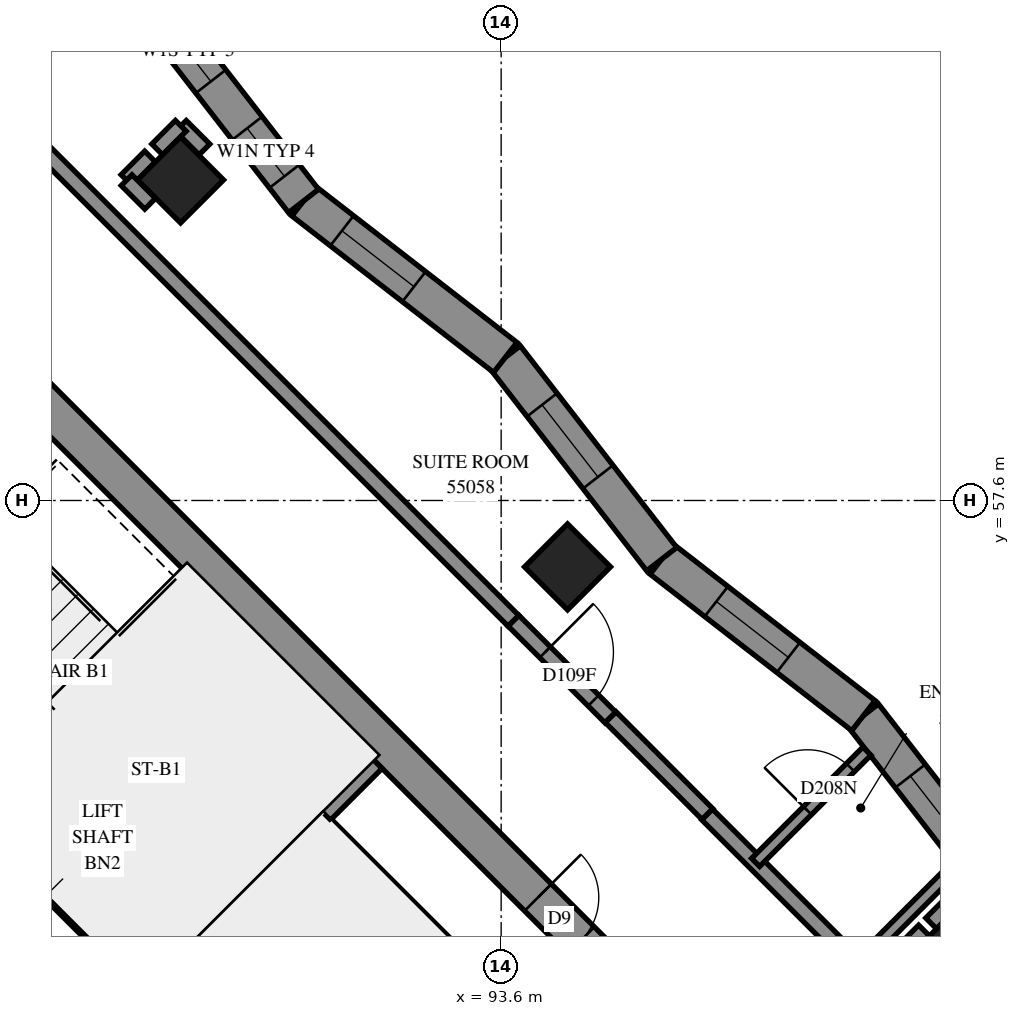
"""IFC4 building model, lengths in metres.
Left out: names, types, materials, properties, quantities, classifications, styles, units other than length and angle.
Written with IfcOpenShell. Run it as: python <this file> out.ifc"""

import sys

from ifc_helpers import new_model, si_unit, direction, frame, frame_2d, origin, origin_2d, place, context, subcontext, project, spatial, polyline, rectangle, outline, extrude, element, fill, save


model = new_model("IFC4")
c1 = context("Model", 3, precision=1e-05, world=origin(), true_north=direction((0.0, 1.0)))
c2 = subcontext(c1, "Body", "Model", "MODEL_VIEW")
j1 = project(units=[si_unit("LENGTHUNIT", "METRE"), si_unit("PLANEANGLEUNIT", "RADIAN")], contexts=[c1])
p1 = place(None, origin())
s1 = spatial("IfcSite", under=j1, at=p1, CompositionType="ELEMENT")
p2 = place(p1, origin())
s2 = spatial("IfcBuilding", under=s1, at=p2, CompositionType="ELEMENT")
p3 = place(p2, frame((0.0, 0.0, 203.2)))
s3 = spatial("IfcBuildingStorey", under=s2, at=p3, CompositionType="ELEMENT", Elevation=203.2)
for number, where, z_axis, x_axis in (
    (1, (89.382, 61.818, 0.0), (0.0, 0.0, 1.0), (0.707, -0.707, 0.0)),
    (2, (94.474, 56.727, 0.0), (0.0, 0.0, 1.0), (0.707, -0.707, 0.0)),
    (3, (99.565, 51.635, 0.0), (0.0, 0.0, 1.0), (0.707, -0.707, 0.0)),
):
    element("IfcColumn", number, at=place(p3, frame(where, z_axis=z_axis, x_axis=x_axis)), inside=s3, PredefinedType="COLUMN", context=c2, shape_type="SweptSolid", body=[
        extrude(rectangle(XDim=0.8, YDim=0.8, at=origin_2d()), origin(), (0.0, 0.0, 1.0), 3.1),
    ])
p4 = place(p3, frame((86.66, 59.802, -0.3), z_axis=(0.0, 0.0, 1.0), x_axis=(0.7071067812, -0.7071067812, 0.0)))
e4 = element("IfcWall", 4, at=p4, inside=s3, PredefinedType="SHEAR", context=c2, shape_type="SweptSolid", body=[
    extrude(rectangle(XDim=15.4, YDim=0.5, at=frame_2d((7.7, 0.0))), origin(), (0.0, 0.0, 1.0), 2.7),
])
p5 = place(p4, frame((10.5, 0.0, 0.3)))
e5 = element("IfcOpeningElement", 5, at=p5, cuts=e4, PredefinedType="OPENING", context=c2, shape_type="SweptSolid", body=[
    extrude(rectangle(XDim=0.8, YDim=2.1, at=frame_2d((0.4, 1.05))), frame((0.0, 0.26, 0.0), z_axis=(0.0, -1.0, 0.0), x_axis=(1.0, 0.0, 0.0)), (0.0, 0.0, 1.0), 0.52),
])
p6 = place(p3, frame((81.534, 53.969, 0.0), z_axis=(0.0, 0.0, 1.0), x_axis=(0.707103309, -0.7071102534, 0.0)))
e6 = element("IfcWall", 6, at=p6, inside=s3, PredefinedType="SOLIDWALL", context=c2, shape_type="SweptSolid", body=[
    extrude(rectangle(XDim=14.4, YDim=0.3, at=frame_2d((7.2, 0.0))), origin(), (0.0, 0.0, 1.0), 3.1),
])
p7 = place(p6, frame((1.25, 0.0, 0.0)))
e7 = element("IfcOpeningElement", 7, at=p7, cuts=e6, PredefinedType="OPENING", context=c2, shape_type="SweptSolid", body=[
    extrude(rectangle(XDim=1.1, YDim=2.1, at=frame_2d((0.55, 1.05))), frame((0.0, 0.16, 0.0), z_axis=(0.0, -1.0, 0.0), x_axis=(1.0, 0.0, 0.0)), (0.0, 0.0, 1.0), 0.32),
])
p8 = place(p6, frame((4.85, 0.0, 0.0)))
e8 = element("IfcOpeningElement", 8, at=p8, cuts=e6, PredefinedType="OPENING", context=c2, shape_type="SweptSolid", body=[
    extrude(rectangle(XDim=1.1, YDim=2.1, at=frame_2d((0.55, 1.05))), frame((0.0, 0.16, 0.0), z_axis=(0.0, -1.0, 0.0), x_axis=(1.0, 0.0, 0.0)), (0.0, 0.0, 1.0), 0.32),
])
p9 = place(p6, frame((8.45, 0.0, 0.0)))
e9 = element("IfcOpeningElement", 9, at=p9, cuts=e6, PredefinedType="OPENING", context=c2, shape_type="SweptSolid", body=[
    extrude(rectangle(XDim=1.1, YDim=2.1, at=frame_2d((0.55, 1.05))), frame((0.0, 0.16, 0.0), z_axis=(0.0, -1.0, 0.0), x_axis=(1.0, 0.0, 0.0)), (0.0, 0.0, 1.0), 0.32),
])
p10 = place(p6, frame((12.05, 0.0, 0.0)))
e10 = element("IfcOpeningElement", 10, at=p10, cuts=e6, PredefinedType="OPENING", context=c2, shape_type="SweptSolid", body=[
    extrude(rectangle(XDim=1.1, YDim=2.1, at=frame_2d((0.55, 1.05))), frame((0.0, 0.16, 0.0), z_axis=(0.0, -1.0, 0.0), x_axis=(1.0, 0.0, 0.0)), (0.0, 0.0, 1.0), 0.32),
])
p11 = place(p3, frame((83.867, 56.302, 0.0), z_axis=(0.0, 0.0, 1.0), x_axis=(0.7071137256, -0.7070998367, 0.0)))
e11 = element("IfcWall", 11, at=p11, inside=s3, PredefinedType="SOLIDWALL", context=c2, shape_type="SweptSolid", body=[
    extrude(rectangle(XDim=7.2, YDim=0.3, at=frame_2d((3.6, 0.0))), origin(), (0.0, 0.0, 1.0), 3.1),
])
p12 = place(p3, frame((88.958, 51.211, 0.0), z_axis=(0.0, 0.0, 1.0), x_axis=(0.7071067812, 0.7071067812, 0.0)))
e12 = element("IfcWall", 12, at=p12, inside=s3, PredefinedType="SOLIDWALL", context=c2, shape_type="SweptSolid", body=[
    extrude(rectangle(XDim=4.2, YDim=0.3, at=frame_2d((2.1, 0.0))), origin(), (0.0, 0.0, 1.0), 3.1),
])
p13 = place(p3, frame((100.438, 52.099, 0.0), z_axis=(0.0, 0.0, 1.0), x_axis=(-0.6128751624, 0.7901797487, 0.0)))
e13 = element("IfcWall", 13, at=p13, inside=s3, PredefinedType="SOLIDWALL", context=c2, shape_type="SweptSolid", body=[
    extrude(outline(polyline([(0.054, -0.25), (3.412, -0.25), (3.349, 0.25), (-0.054, 0.25), (0.054, -0.25)])), origin(), (0.0, 0.0, 1.0), 3.1),
])
p14 = place(p13, frame((1.175, 0.0, 0.45)))
e14 = element("IfcOpeningElement", 14, at=p14, cuts=e13, PredefinedType="OPENING", context=c2, shape_type="SweptSolid", body=[
    extrude(rectangle(XDim=1.2, YDim=2.5, at=frame_2d((0.6, 1.25))), frame((0.0, 0.26, 0.0), z_axis=(0.0, -1.0, 0.0), x_axis=(1.0, 0.0, 0.0)), (0.0, 0.0, 1.0), 0.52),
])
p15 = place(p3, frame((98.366, 54.77, 0.0), z_axis=(0.0, 0.0, 1.0), x_axis=(-0.7901836045, 0.6128701911, 0.0)))
e15 = element("IfcWall", 15, at=p15, inside=s3, PredefinedType="SOLIDWALL", context=c2, shape_type="SweptSolid", body=[
    extrude(outline(polyline([(-0.032, -0.25), (3.327, -0.25), (3.39, 0.25), (0.032, 0.25), (-0.032, -0.25)])), origin(), (0.0, 0.0, 1.0), 3.1),
])
p16 = place(p15, frame((1.249, 0.0, 0.45)))
e16 = element("IfcOpeningElement", 16, at=p16, cuts=e15, PredefinedType="OPENING", context=c2, shape_type="SweptSolid", body=[
    extrude(rectangle(XDim=1.2, YDim=2.5, at=frame_2d((0.6, 1.25))), frame((0.0, 0.26, 0.0), z_axis=(0.0, -1.0, 0.0), x_axis=(1.0, 0.0, 0.0)), (0.0, 0.0, 1.0), 0.52),
])
p17 = place(p3, frame((95.712, 56.828, 0.0), z_axis=(0.0, 0.0, 1.0), x_axis=(-0.6128887822, 0.7901691849, 0.0)))
e17 = element("IfcWall", 17, at=p17, inside=s3, PredefinedType="SOLIDWALL", context=c2, shape_type="SweptSolid", body=[
    extrude(outline(polyline([(0.032, -0.25), (3.39, -0.25), (3.327, 0.25), (-0.032, 0.25), (0.032, -0.25)])), origin(), (0.0, 0.0, 1.0), 3.1),
])
p18 = place(p17, frame((1.369, 0.0, 0.45)))
e18 = element("IfcOpeningElement", 18, at=p18, cuts=e17, PredefinedType="OPENING", context=c2, shape_type="SweptSolid", body=[
    extrude(rectangle(XDim=1.2, YDim=2.5, at=frame_2d((0.6, 1.25))), frame((0.0, 0.26, 0.0), z_axis=(0.0, -1.0, 0.0), x_axis=(1.0, 0.0, 0.0)), (0.0, 0.0, 1.0), 0.52),
])
p19 = place(p3, frame((93.654, 59.482, 0.0), z_axis=(0.0, 0.0, 1.0), x_axis=(-0.7901691849, 0.6128887822, 0.0)))
e19 = element("IfcWall", 19, at=p19, inside=s3, PredefinedType="SOLIDWALL", context=c2, shape_type="SweptSolid", body=[
    extrude(outline(polyline([(-0.032, -0.25), (3.327, -0.25), (3.39, 0.25), (0.032, 0.25), (-0.032, -0.25)])), origin(), (0.0, 0.0, 1.0), 3.1),
])
p20 = place(p19, frame((1.52, 0.0, 0.45)))
e20 = element("IfcOpeningElement", 20, at=p20, cuts=e19, PredefinedType="OPENING", context=c2, shape_type="SweptSolid", body=[
    extrude(rectangle(XDim=1.2, YDim=2.5, at=frame_2d((0.6, 1.25))), frame((0.0, 0.26, 0.0), z_axis=(0.0, -1.0, 0.0), x_axis=(1.0, 0.0, 0.0)), (0.0, 0.0, 1.0), 0.52),
])
p21 = place(p3, frame((91.0, 61.541, 0.0), z_axis=(0.0, 0.0, 1.0), x_axis=(-0.6128701911, 0.7901836045, 0.0)))
e21 = element("IfcWall", 21, at=p21, inside=s3, PredefinedType="SOLIDWALL", context=c2, shape_type="SweptSolid", body=[
    extrude(outline(polyline([(0.032, -0.25), (3.39, -0.25), (3.327, 0.25), (-0.032, 0.25), (0.032, -0.25)])), origin(), (0.0, 0.0, 1.0), 3.1),
])
p22 = place(p21, frame((0.41, 0.0, 0.45)))
e22 = element("IfcOpeningElement", 22, at=p22, cuts=e21, PredefinedType="OPENING", context=c2, shape_type="SweptSolid", body=[
    extrude(rectangle(XDim=0.8, YDim=2.5, at=frame_2d((0.4, 1.25))), frame((0.0, 0.26, 0.0), z_axis=(0.0, -1.0, 0.0), x_axis=(1.0, 0.0, 0.0)), (0.0, 0.0, 1.0), 0.52),
])
p23 = place(p21, frame((1.99, 0.0, 0.45)))
e23 = element("IfcOpeningElement", 23, at=p23, cuts=e21, PredefinedType="OPENING", context=c2, shape_type="SweptSolid", body=[
    extrude(rectangle(XDim=1.0, YDim=2.5, at=frame_2d((0.5, 1.25))), frame((0.0, 0.26, 0.0), z_axis=(0.0, -1.0, 0.0), x_axis=(1.0, 0.0, 0.0)), (0.0, 0.0, 1.0), 0.52),
])
p24 = place(p3, frame((91.313, 53.354, 0.0), z_axis=(0.0, 0.0, 1.0), x_axis=(0.7071067812, -0.7071067812, 0.0)))
e24 = element("IfcWall", 24, at=p24, inside=s3, PredefinedType="PARTITIONING", context=c2, shape_type="SweptSolid", body=[
    extrude(rectangle(XDim=5.95, YDim=0.15, at=frame_2d((2.975, 0.0))), origin(), (0.0, 0.0, 1.0), 3.1),
])
p25 = place(p3, frame((86.835, 62.945, 0.0), z_axis=(0.0, 0.0, 1.0), x_axis=(0.7071067812, -0.7071067812, 0.0)))
e25 = element("IfcWall", 25, at=p25, inside=s3, PredefinedType="PARTITIONING", context=c2, shape_type="SweptSolid", body=[
    extrude(rectangle(XDim=9.798, YDim=0.2, at=frame_2d((4.899, 0.0))), origin(), (0.0, 0.0, 1.0), 3.1),
])
p26 = place(p3, frame((96.309, 53.471, 0.0), z_axis=(0.0, 0.0, 1.0), x_axis=(0.7071067812, -0.7071067812, 0.0)))
e26 = element("IfcWall", 26, at=p26, inside=s3, PredefinedType="PARTITIONING", context=c2, shape_type="SweptSolid", body=[
    extrude(rectangle(XDim=6.2, YDim=0.2, at=frame_2d((3.1, 0.0))), origin(), (0.0, 0.0, 1.0), 3.1),
])
p27 = place(p3, frame((96.948, 52.838, 0.0), z_axis=(0.0, 0.0, 1.0), x_axis=(0.7070826384, 0.7071309232, 0.0)))
e27 = element("IfcWall", 27, at=p27, inside=s3, PredefinedType="PARTITIONING", context=c2, shape_type="SweptSolid", body=[
    extrude(rectangle(XDim=2.071, YDim=0.15, at=frame_2d((1.036, 0.0))), origin(), (0.0, 0.0, 1.0), 3.1),
])
p28 = place(p27, frame((0.965, 0.0, 0.0)))
e28 = element("IfcOpeningElement", 28, at=p28, cuts=e27, PredefinedType="OPENING", context=c2, shape_type="SweptSolid", body=[
    extrude(rectangle(XDim=0.8, YDim=2.1, at=frame_2d((0.4, 1.05))), frame((0.0, 0.085, 0.0), z_axis=(0.0, -1.0, 0.0), x_axis=(1.0, 0.0, 0.0)), (0.0, 0.0, 1.0), 0.17),
])
p29 = place(p3, frame((93.763, 56.017, 0.0), z_axis=(0.0, 0.0, 1.0), x_axis=(0.7076620277, -0.7065510983, 0.0)))
e29 = element("IfcWall", 29, at=p29, inside=s3, PredefinedType="PARTITIONING", context=c2, shape_type="SweptSolid", body=[
    extrude(rectangle(XDim=1.8, YDim=0.2, at=frame_2d((0.9, 0.0))), origin(), (0.0, 0.0, 1.0), 3.1),
])
p30 = place(p29, frame((0.585, 0.0, 0.0)))
e30 = element("IfcOpeningElement", 30, at=p30, cuts=e29, PredefinedType="OPENING", context=c2, shape_type="SweptSolid", body=[
    extrude(rectangle(XDim=0.9, YDim=2.1, at=frame_2d((0.45, 1.05))), frame((0.0, 0.11, 0.0), z_axis=(0.0, -1.0, 0.0), x_axis=(1.0, 0.0, 0.0)), (0.0, 0.0, 1.0), 0.22),
])
p31 = place(p3, frame((95.041, 54.749, 0.0), z_axis=(0.0, 0.0, 1.0), x_axis=(0.7065510983, -0.7076620277, 0.0)))
e31 = element("IfcWall", 31, at=p31, inside=s3, PredefinedType="PARTITIONING", context=c2, shape_type="SweptSolid", body=[
    extrude(rectangle(XDim=1.8, YDim=0.2, at=frame_2d((0.9, 0.0))), origin(), (0.0, 0.0, 1.0), 3.1),
])
p32 = place(p3, frame((98.291, 51.495, 0.0), z_axis=(0.0, 0.0, 1.0), x_axis=(0.7071067812, 0.7071067812, 0.0)))
e32 = element("IfcWall", 32, at=p32, inside=s3, PredefinedType="PARTITIONING", context=c2, shape_type="SweptSolid", body=[
    extrude(rectangle(XDim=1.831, YDim=0.15, at=frame_2d((0.915, 0.0))), origin(), (0.0, 0.0, 1.0), 3.1),
])
for number, where, z_axis, x_axis in (
    (33, (98.853, 51.633, 0.0), (0.0, 0.0, 1.0), (0.707, 0.707, 0.0)),
    (34, (88.671, 61.815, 0.0), (0.0, 0.0, 1.0), (0.707, 0.707, 0.0)),
    (35, (88.672, 61.814, 0.0), (0.0, 0.0, 1.0), (0.707, -0.707, 0.0)),
    (36, (89.386, 62.528, 0.0), (0.0, 0.0, 1.0), (0.707, -0.707, 0.0)),
    (37, (89.075, 62.219, 0.0), (0.0, 0.0, 1.0), (0.707, 0.707, 0.0)),
):
    element("IfcWall", number, at=place(p3, frame(where, z_axis=z_axis, x_axis=x_axis)), inside=s3, PredefinedType="PARTITIONING", context=c2, shape_type="SweptSolid", body=[
        extrude(rectangle(XDim=0.438, YDim=0.2, at=frame_2d((0.219, 0.0))), origin(), (0.0, 0.0, 1.0), 3.1),
    ])
p33 = place(p3, frame((99.257, 52.037, 0.0), z_axis=(0.0, 0.0, 1.0), x_axis=(0.7071067812, 0.7071067812, 0.0)))
e38 = element("IfcWall", 38, at=p33, inside=s3, PredefinedType="PARTITIONING", context=c2, shape_type="SweptSolid", body=[
    extrude(rectangle(XDim=0.727, YDim=0.2, at=frame_2d((0.363, 0.0))), origin(), (0.0, 0.0, 1.0), 3.1),
])
p34 = place(p14, origin())
e39 = element("IfcWindow", 39, at=p34, inside=s3, PartitioningType="SINGLE_PANEL", PredefinedType="WINDOW", context=c2, shape_type="SweptSolid", body=[
    extrude(rectangle(XDim=1.2, YDim=2.5, at=frame_2d((0.6, 1.25))), frame((0.0, 0.18, 0.0), z_axis=(0.0, -1.0, 0.0), x_axis=(1.0, 0.0, 0.0)), (0.0, 0.0, 1.0), 0.06),
])
fill(e14, e39)
p35 = place(p16, origin())
e40 = element("IfcWindow", 40, at=p35, inside=s3, PartitioningType="SINGLE_PANEL", PredefinedType="WINDOW", context=c2, shape_type="SweptSolid", body=[
    extrude(rectangle(XDim=1.2, YDim=2.5, at=frame_2d((0.6, 1.25))), frame((0.0, 0.18, 0.0), z_axis=(0.0, -1.0, 0.0), x_axis=(1.0, 0.0, 0.0)), (0.0, 0.0, 1.0), 0.06),
])
fill(e16, e40)
p36 = place(p18, origin())
e41 = element("IfcWindow", 41, at=p36, inside=s3, PartitioningType="SINGLE_PANEL", PredefinedType="WINDOW", context=c2, shape_type="SweptSolid", body=[
    extrude(rectangle(XDim=1.2, YDim=2.5, at=frame_2d((0.6, 1.25))), frame((0.0, 0.18, 0.0), z_axis=(0.0, -1.0, 0.0), x_axis=(1.0, 0.0, 0.0)), (0.0, 0.0, 1.0), 0.06),
])
fill(e18, e41)
p37 = place(p20, origin())
e42 = element("IfcWindow", 42, at=p37, inside=s3, PartitioningType="SINGLE_PANEL", PredefinedType="WINDOW", context=c2, shape_type="SweptSolid", body=[
    extrude(rectangle(XDim=1.2, YDim=2.5, at=frame_2d((0.6, 1.25))), frame((0.0, 0.18, 0.0), z_axis=(0.0, -1.0, 0.0), x_axis=(1.0, 0.0, 0.0)), (0.0, 0.0, 1.0), 0.06),
])
fill(e20, e42)
p38 = place(p5, origin())
e43 = element("IfcDoor", 43, at=p38, inside=s3, OperationType="SINGLE_SWING_RIGHT", PredefinedType="DOOR", context=c2, shape_type="SweptSolid", body=[
    extrude(rectangle(XDim=0.8, YDim=2.1, at=frame_2d((0.4, 1.05))), frame((0.0, 0.025, 0.0), z_axis=(0.0, -1.0, 0.0), x_axis=(1.0, 0.0, 0.0)), (0.0, 0.0, 1.0), 0.05),
])
fill(e5, e43)
p39 = place(p30, origin())
e44 = element("IfcDoor", 44, at=p39, inside=s3, OperationType="SINGLE_SWING_LEFT", PredefinedType="DOOR", context=c2, shape_type="SweptSolid", body=[
    extrude(rectangle(XDim=0.9, YDim=2.1, at=frame_2d((0.45, 1.05))), frame((0.0, 0.025, 0.0), z_axis=(0.0, -1.0, 0.0), x_axis=(1.0, 0.0, 0.0)), (0.0, 0.0, 1.0), 0.05),
])
fill(e30, e44)
p40 = place(p28, origin())
e45 = element("IfcDoor", 45, at=p40, inside=s3, OperationType="SINGLE_SWING_RIGHT", PredefinedType="DOOR", context=c2, shape_type="SweptSolid", body=[
    extrude(rectangle(XDim=0.8, YDim=2.1, at=frame_2d((0.4, 1.05))), frame((0.0, 0.025, 0.0), z_axis=(0.0, -1.0, 0.0), x_axis=(1.0, 0.0, 0.0)), (0.0, 0.0, 1.0), 0.05),
])
fill(e28, e45)
p41 = place(p22, origin())
e46 = element("IfcWindow", 46, at=p41, inside=s3, PartitioningType="SINGLE_PANEL", PredefinedType="WINDOW", context=c2, shape_type="SweptSolid", body=[
    extrude(rectangle(XDim=0.8, YDim=2.5, at=frame_2d((0.4, 1.25))), frame((0.0, 0.18, 0.0), z_axis=(0.0, -1.0, 0.0), x_axis=(1.0, 0.0, 0.0)), (0.0, 0.0, 1.0), 0.06),
])
fill(e22, e46)
p42 = place(p23, origin())
e47 = element("IfcWindow", 47, at=p42, inside=s3, PartitioningType="SINGLE_PANEL", PredefinedType="WINDOW", context=c2, shape_type="SweptSolid", body=[
    extrude(rectangle(XDim=1.0, YDim=2.5, at=frame_2d((0.5, 1.25))), frame((0.0, 0.18, 0.0), z_axis=(0.0, -1.0, 0.0), x_axis=(1.0, 0.0, 0.0)), (0.0, 0.0, 1.0), 0.06),
])
fill(e23, e47)
save(model, sys.argv[1])
